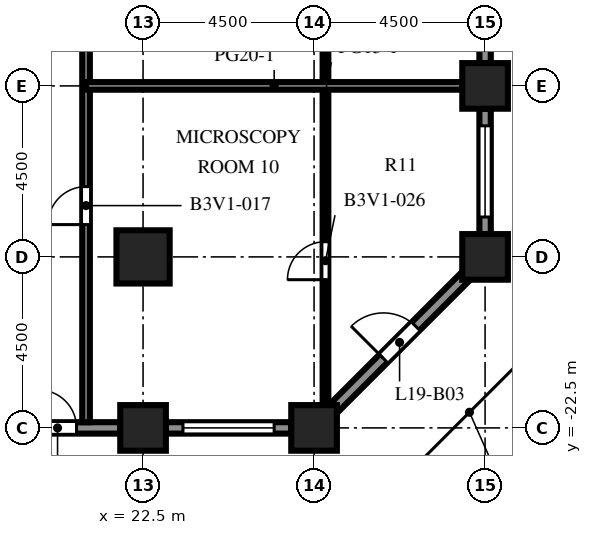
"""IFC4 building model, lengths in metres.
Left out: names, types, materials, properties, quantities, classifications, styles, units other than length and angle.
Written with IfcOpenShell. Run it as: python <this file> out.ifc"""

import sys

from ifc_helpers import new_model, si_unit, direction, frame, frame_2d, origin, origin_2d, place, context, subcontext, project, spatial, rectangle, extrude, element, fill, save


model = new_model("IFC4")
c1 = context("Model", 3, precision=1e-05, world=origin(), true_north=direction((0.0, 1.0)))
c2 = subcontext(c1, "Body", "Model", "MODEL_VIEW")
j1 = project(units=[si_unit("LENGTHUNIT", "METRE"), si_unit("PLANEANGLEUNIT", "RADIAN")], contexts=[c1])
p1 = place(None, origin())
s1 = spatial("IfcSite", under=j1, at=p1, CompositionType="ELEMENT")
p2 = place(p1, origin())
s2 = spatial("IfcBuilding", under=s1, at=p2, CompositionType="ELEMENT")
p3 = place(p2, frame((0.0, 0.0, 86.1)))
s3 = spatial("IfcBuildingStorey", under=s2, at=p3, CompositionType="ELEMENT", Elevation=86.1)
for number, where, z_axis, x_axis in (
    (1, (22.5, -22.5, 0.0), (0.0, 0.0, 1.0), (1.0, 0.0, 0.0)),
    (2, (27.0, -22.5, 0.0), (0.0, 0.0, 1.0), (1.0, 0.0, 0.0)),
    (3, (31.5, -18.0, 0.0), (0.0, 0.0, 1.0), (1.0, 0.0, 0.0)),
    (4, (31.5, -13.5, 0.0), (0.0, 0.0, 1.0), (1.0, 0.0, 0.0)),
):
    element("IfcColumn", number, at=place(p3, frame(where, z_axis=z_axis, x_axis=x_axis)), inside=s3, PredefinedType="COLUMN", context=c2, shape_type="SweptSolid", body=[
        extrude(rectangle(XDim=1.2, YDim=1.2, at=origin_2d()), origin(), (0.0, 0.0, 1.0), 4.1),
    ])
p4 = place(p3, frame((22.5, -18.0, 0.0), z_axis=(0.0, 0.0, 1.0), x_axis=(1.0, 0.0, 0.0)))
e5 = element("IfcColumn", 5, at=p4, inside=s3, PredefinedType="COLUMN", context=c2, shape_type="SweptSolid", body=[
    extrude(rectangle(XDim=1.4, YDim=1.4, at=origin_2d()), origin(), (0.0, 0.0, 1.0), 4.1),
])
p5 = place(p3, frame((21.9, -22.5, 0.0), z_axis=(0.0, 0.0, 1.0), x_axis=(-1.0, 0.0, 0.0)))
e6 = element("IfcWall", 6, at=p5, inside=s3, PredefinedType="SOLIDWALL", context=c2, shape_type="SweptSolid", body=[
    extrude(rectangle(XDim=3.3, YDim=0.3, at=frame_2d((1.65, 0.0))), origin(), (0.0, 0.0, 1.0), 2.75),
])
p6 = place(p5, frame((1.15, 0.0, 0.0)))
e7 = element("IfcOpeningElement", 7, at=p6, cuts=e6, PredefinedType="OPENING", context=c2, shape_type="SweptSolid", body=[
    extrude(rectangle(XDim=1.0, YDim=2.2, at=frame_2d((0.5, 1.1))), frame((0.0, 0.16, 0.0), z_axis=(0.0, -1.0, 0.0), x_axis=(1.0, 0.0, 0.0)), (0.0, 0.0, 1.0), 0.32),
])
p7 = place(p3, frame((26.4, -22.5, 0.0), z_axis=(0.0, 0.0, 1.0), x_axis=(-1.0, 0.0, 0.0)))
e8 = element("IfcWall", 8, at=p7, inside=s3, PredefinedType="SOLIDWALL", context=c2, shape_type="SweptSolid", body=[
    extrude(rectangle(XDim=3.3, YDim=0.3, at=frame_2d((1.65, 0.0))), origin(), (0.0, 0.0, 1.0), 2.75),
])
p8 = place(p7, frame((0.45, 0.0, 0.8)))
e9 = element("IfcOpeningElement", 9, at=p8, cuts=e8, PredefinedType="OPENING", context=c2, shape_type="SweptSolid", body=[
    extrude(rectangle(XDim=2.4, YDim=1.7, at=frame_2d((1.2, 0.85))), frame((0.0, 0.16, 0.0), z_axis=(0.0, -1.0, 0.0), x_axis=(1.0, 0.0, 0.0)), (0.0, 0.0, 1.0), 0.32),
])
p9 = place(p3, frame((31.006, -18.494, 0.0), z_axis=(0.0, 0.0, 1.0), x_axis=(-0.707106781187, -0.707106781187, 0.0)))
e10 = element("IfcWall", 10, at=p9, inside=s3, PredefinedType="SOLIDWALL", context=c2, shape_type="SweptSolid", body=[
    extrude(rectangle(XDim=4.967, YDim=0.3, at=frame_2d((2.483, 0.0))), origin(), (0.0, 0.0, 1.0), 2.75),
])
p10 = place(p9, frame((1.884, 0.0, 0.0)))
e11 = element("IfcOpeningElement", 11, at=p10, cuts=e10, PredefinedType="OPENING", context=c2, shape_type="SweptSolid", body=[
    extrude(rectangle(XDim=1.2, YDim=2.2, at=frame_2d((0.6, 1.1))), frame((0.0, 0.16, 0.0), z_axis=(0.0, -1.0, 0.0), x_axis=(1.0, 0.0, 0.0)), (0.0, 0.0, 1.0), 0.32),
])
p11 = place(p3, frame((31.5, -14.1, 0.0), z_axis=(0.0, 0.0, 1.0), x_axis=(0.0, -1.0, 0.0)))
e12 = element("IfcWall", 12, at=p11, inside=s3, PredefinedType="SOLIDWALL", context=c2, shape_type="SweptSolid", body=[
    extrude(rectangle(XDim=3.3, YDim=0.3, at=frame_2d((1.65, 0.0))), origin(), (0.0, 0.0, 1.0), 2.75),
])
p12 = place(p11, frame((0.45, 0.0, 0.8)))
e13 = element("IfcOpeningElement", 13, at=p12, cuts=e12, PredefinedType="OPENING", context=c2, shape_type="SweptSolid", body=[
    extrude(rectangle(XDim=2.4, YDim=1.7, at=frame_2d((1.2, 0.85))), frame((0.0, 0.16, 0.0), z_axis=(0.0, -1.0, 0.0), x_axis=(1.0, 0.0, 0.0)), (0.0, 0.0, 1.0), 0.32),
])
p13 = place(p3, frame((31.5, -9.6, 0.0), z_axis=(0.0, 0.0, 1.0), x_axis=(0.0, -1.0, 0.0)))
e14 = element("IfcWall", 14, at=p13, inside=s3, PredefinedType="SOLIDWALL", context=c2, shape_type="SweptSolid", body=[
    extrude(rectangle(XDim=3.3, YDim=0.3, at=frame_2d((1.65, 0.0))), origin(), (0.0, 0.0, 1.0), 2.75),
])
p14 = place(p13, frame((1.15, 0.0, 0.0)))
e15 = element("IfcOpeningElement", 15, at=p14, cuts=e14, PredefinedType="OPENING", context=c2, shape_type="SweptSolid", body=[
    extrude(rectangle(XDim=1.0, YDim=2.2, at=frame_2d((0.5, 1.1))), frame((0.0, 0.16, 0.0), z_axis=(0.0, -1.0, 0.0), x_axis=(1.0, 0.0, 0.0)), (0.0, 0.0, 1.0), 0.32),
])
p15 = place(p3, frame((21.0, 31.35, 0.0), z_axis=(0.0, 0.0, 1.0), x_axis=(0.0, -1.0, 0.0)))
e16 = element("IfcWall", 16, at=p15, inside=s3, PredefinedType="PARTITIONING", context=c2, shape_type="SweptSolid", body=[
    extrude(rectangle(XDim=53.7, YDim=0.2, at=frame_2d((26.85, 0.0))), origin(), (0.0, 0.0, 1.0), 3.65),
])
p16 = place(p15, frame((47.5, 0.0, 0.0)))
e17 = element("IfcOpeningElement", 17, at=p16, cuts=e16, PredefinedType="OPENING", context=c2, shape_type="SweptSolid", body=[
    extrude(rectangle(XDim=1.0, YDim=2.1, at=frame_2d((0.5, 1.05))), frame((0.0, 0.11, 0.0), z_axis=(0.0, -1.0, 0.0), x_axis=(1.0, 0.0, 0.0)), (0.0, 0.0, 1.0), 0.22),
])
p17 = place(p15, frame((37.5, 0.0, 0.0)))
e18 = element("IfcOpeningElement", 18, at=p17, cuts=e16, PredefinedType="OPENING", context=c2, shape_type="SweptSolid", body=[
    extrude(rectangle(XDim=1.0, YDim=2.1, at=frame_2d((0.5, 1.05))), frame((0.0, 0.11, 0.0), z_axis=(0.0, -1.0, 0.0), x_axis=(1.0, 0.0, 0.0)), (0.0, 0.0, 1.0), 0.22),
])
p18 = place(p15, frame((27.25, 0.0, 0.0)))
e19 = element("IfcOpeningElement", 19, at=p18, cuts=e16, PredefinedType="OPENING", context=c2, shape_type="SweptSolid", body=[
    extrude(rectangle(XDim=1.0, YDim=2.1, at=frame_2d((0.5, 1.05))), frame((0.0, 0.11, 0.0), z_axis=(0.0, -1.0, 0.0), x_axis=(1.0, 0.0, 0.0)), (0.0, 0.0, 1.0), 0.22),
])
p19 = place(p15, frame((17.5, 0.0, 0.0)))
e20 = element("IfcOpeningElement", 20, at=p19, cuts=e16, PredefinedType="OPENING", context=c2, shape_type="SweptSolid", body=[
    extrude(rectangle(XDim=1.0, YDim=2.1, at=frame_2d((0.5, 1.05))), frame((0.0, 0.11, 0.0), z_axis=(0.0, -1.0, 0.0), x_axis=(1.0, 0.0, 0.0)), (0.0, 0.0, 1.0), 0.22),
])
p20 = place(p15, frame((10.75, 0.0, 0.0)))
e21 = element("IfcOpeningElement", 21, at=p20, cuts=e16, PredefinedType="OPENING", context=c2, shape_type="SweptSolid", body=[
    extrude(rectangle(XDim=1.0, YDim=2.1, at=frame_2d((0.5, 1.05))), frame((0.0, 0.11, 0.0), z_axis=(0.0, -1.0, 0.0), x_axis=(1.0, 0.0, 0.0)), (0.0, 0.0, 1.0), 0.22),
])
p21 = place(p15, frame((5.25, 0.0, 0.0)))
e22 = element("IfcOpeningElement", 22, at=p21, cuts=e16, PredefinedType="OPENING", context=c2, shape_type="SweptSolid", body=[
    extrude(rectangle(XDim=1.0, YDim=2.1, at=frame_2d((0.5, 1.05))), frame((0.0, 0.11, 0.0), z_axis=(0.0, -1.0, 0.0), x_axis=(1.0, 0.0, 0.0)), (0.0, 0.0, 1.0), 0.22),
])
p22 = place(p3, frame((27.3, -9.7, 0.0), z_axis=(0.0, 0.0, 1.0), x_axis=(0.0, -1.0, 0.0)))
e23 = element("IfcWall", 23, at=p22, inside=s3, PredefinedType="PARTITIONING", context=c2, shape_type="SweptSolid", body=[
    extrude(rectangle(XDim=12.077, YDim=0.15, at=frame_2d((6.039, 0.0))), origin(), (0.0, 0.0, 1.0), 3.65),
])
p23 = place(p22, frame((7.9, 0.0, 0.0)))
e24 = element("IfcOpeningElement", 24, at=p23, cuts=e23, PredefinedType="OPENING", context=c2, shape_type="SweptSolid", body=[
    extrude(rectangle(XDim=1.0, YDim=2.1, at=frame_2d((0.5, 1.05))), frame((0.0, 0.085, 0.0), z_axis=(0.0, -1.0, 0.0), x_axis=(1.0, 0.0, 0.0)), (0.0, 0.0, 1.0), 0.17),
])
p24 = place(p3, frame((21.0, -13.5, 0.0), z_axis=(0.0, 0.0, 1.0), x_axis=(1.0, 0.0, 0.0)))
e25 = element("IfcWall", 25, at=p24, inside=s3, PredefinedType="PARTITIONING", context=c2, shape_type="SweptSolid", body=[
    extrude(rectangle(XDim=9.9, YDim=0.2, at=frame_2d((4.95, 0.0))), origin(), (0.0, 0.0, 1.0), 3.65),
])
p25 = place(p6, origin())
e26 = element("IfcDoor", 26, at=p25, inside=s3, OperationType="SINGLE_SWING_RIGHT", PredefinedType="DOOR", context=c2, shape_type="SweptSolid", body=[
    extrude(rectangle(XDim=1.0, YDim=2.2, at=frame_2d((0.5, 1.1))), frame((0.0, 0.025, 0.0), z_axis=(0.0, -1.0, 0.0), x_axis=(1.0, 0.0, 0.0)), (0.0, 0.0, 1.0), 0.05),
])
fill(e7, e26)
p26 = place(p8, origin())
e27 = element("IfcWindow", 27, at=p26, inside=s3, PartitioningType="SINGLE_PANEL", PredefinedType="WINDOW", context=c2, shape_type="SweptSolid", body=[
    extrude(rectangle(XDim=2.4, YDim=1.7, at=frame_2d((1.2, 0.85))), frame((0.0, 0.03, 0.0), z_axis=(0.0, -1.0, 0.0), x_axis=(1.0, 0.0, 0.0)), (0.0, 0.0, 1.0), 0.06),
])
fill(e9, e27)
p27 = place(p10, origin())
e28 = element("IfcDoor", 28, at=p27, inside=s3, OperationType="SINGLE_SWING_RIGHT", PredefinedType="DOOR", context=c2, shape_type="SweptSolid", body=[
    extrude(rectangle(XDim=1.2, YDim=2.2, at=frame_2d((0.6, 1.1))), frame((0.0, 0.025, 0.0), z_axis=(0.0, -1.0, 0.0), x_axis=(1.0, 0.0, 0.0)), (0.0, 0.0, 1.0), 0.05),
])
fill(e11, e28)
p28 = place(p12, origin())
e29 = element("IfcWindow", 29, at=p28, inside=s3, PartitioningType="SINGLE_PANEL", PredefinedType="WINDOW", context=c2, shape_type="SweptSolid", body=[
    extrude(rectangle(XDim=2.4, YDim=1.7, at=frame_2d((1.2, 0.85))), frame((0.0, 0.03, 0.0), z_axis=(0.0, -1.0, 0.0), x_axis=(1.0, 0.0, 0.0)), (0.0, 0.0, 1.0), 0.06),
])
fill(e13, e29)
p29 = place(p16, origin())
e30 = element("IfcDoor", 30, at=p29, inside=s3, OperationType="SINGLE_SWING_RIGHT", PredefinedType="DOOR", context=c2, shape_type="SweptSolid", body=[
    extrude(rectangle(XDim=1.0, YDim=2.1, at=frame_2d((0.5, 1.05))), frame((0.0, 0.025, 0.0), z_axis=(0.0, -1.0, 0.0), x_axis=(1.0, 0.0, 0.0)), (0.0, 0.0, 1.0), 0.05),
])
fill(e17, e30)
p30 = place(p23, origin())
e31 = element("IfcDoor", 31, at=p30, inside=s3, OperationType="SINGLE_SWING_RIGHT", PredefinedType="DOOR", context=c2, shape_type="SweptSolid", body=[
    extrude(rectangle(XDim=1.0, YDim=2.1, at=frame_2d((0.5, 1.05))), frame((0.0, 0.025, 0.0), z_axis=(0.0, -1.0, 0.0), x_axis=(1.0, 0.0, 0.0)), (0.0, 0.0, 1.0), 0.05),
])
fill(e24, e31)
save(model, sys.argv[1])
